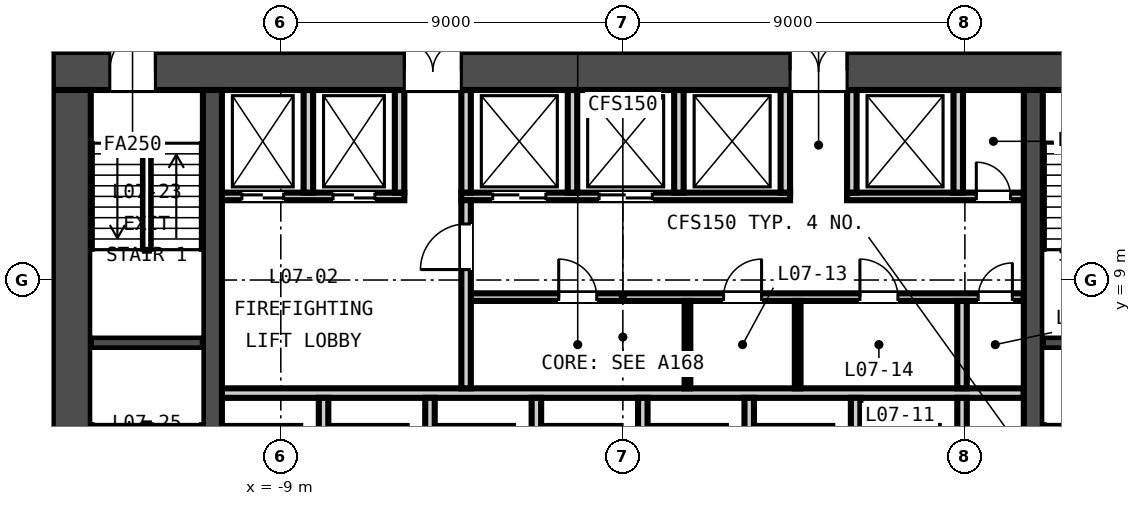
"""IFC4 building model, lengths in metres.
Left out: names, types, materials, properties, quantities, classifications, styles, units other than length and angle.
Written with IfcOpenShell. Run it as: python <this file> out.ifc"""

import sys

from ifc_helpers import new_model, si_unit, direction, frame, frame_2d, origin, place, context, subcontext, project, spatial, rectangle, extrude, element, fill, save


model = new_model("IFC4")
c1 = context("Model", 3, precision=1e-05, world=origin(), true_north=direction((0.0, 1.0)))
c2 = subcontext(c1, "Body", "Model", "MODEL_VIEW")
j1 = project(units=[si_unit("LENGTHUNIT", "METRE"), si_unit("PLANEANGLEUNIT", "RADIAN")], contexts=[c1])
p1 = place(None, origin())
s1 = spatial("IfcSite", under=j1, at=p1, CompositionType="ELEMENT")
p2 = place(p1, origin())
s2 = spatial("IfcBuilding", under=s1, at=p2, CompositionType="ELEMENT")
p3 = place(p2, frame((0.0, 0.0, 39.65)))
s3 = spatial("IfcBuildingStorey", under=s2, at=p3, CompositionType="ELEMENT", Elevation=39.65)
p4 = place(p3, frame((-15.0, 14.5, -0.15), z_axis=(0.0, 0.0, 1.0), x_axis=(1.0, 0.0, 0.0)))
e1 = element("IfcWall", 1, at=p4, inside=s3, PredefinedType="SOLIDWALL", context=c2, shape_type="SweptSolid", body=[
    extrude(rectangle(XDim=30.0, YDim=1.0, at=frame_2d((15.0, 0.0))), origin(), (0.0, 0.0, 1.0), 3.65),
])
p5 = place(p4, frame((9.25, 0.0, 0.15)))
e2 = element("IfcOpeningElement", 2, at=p5, cuts=e1, PredefinedType="OPENING", context=c2, shape_type="SweptSolid", body=[
    extrude(rectangle(XDim=1.5, YDim=2.1, at=frame_2d((0.75, 1.05))), frame((0.0, 0.51, 0.0), z_axis=(0.0, -1.0, 0.0), x_axis=(1.0, 0.0, 0.0)), (0.0, 0.0, 1.0), 1.02),
])
p6 = place(p4, frame((19.4, 0.0, 0.15)))
e3 = element("IfcOpeningElement", 3, at=p6, cuts=e1, PredefinedType="OPENING", context=c2, shape_type="SweptSolid", body=[
    extrude(rectangle(XDim=1.5, YDim=2.1, at=frame_2d((0.75, 1.05))), frame((0.0, 0.51, 0.0), z_axis=(0.0, -1.0, 0.0), x_axis=(1.0, 0.0, 0.0)), (0.0, 0.0, 1.0), 1.02),
])
p7 = place(p4, frame((1.5, 0.0, 0.15)))
e4 = element("IfcOpeningElement", 4, at=p7, cuts=e1, PredefinedType="OPENING", context=c2, shape_type="SweptSolid", body=[
    extrude(rectangle(XDim=1.2, YDim=2.1, at=frame_2d((0.6, 1.05))), frame((0.0, 0.51, 0.0), z_axis=(0.0, -1.0, 0.0), x_axis=(1.0, 0.0, 0.0)), (0.0, 0.0, 1.0), 1.02),
])
p8 = place(p4, frame((27.3, 0.0, 0.15)))
e5 = element("IfcOpeningElement", 5, at=p8, cuts=e1, PredefinedType="OPENING", context=c2, shape_type="SweptSolid", body=[
    extrude(rectangle(XDim=1.2, YDim=2.1, at=frame_2d((0.6, 1.05))), frame((0.0, 0.51, 0.0), z_axis=(0.0, -1.0, 0.0), x_axis=(1.0, 0.0, 0.0)), (0.0, 0.0, 1.0), 1.02),
])
p9 = place(p3, frame((-14.5, 1.0, -0.15), z_axis=(0.0, 0.0, 1.0), x_axis=(0.0, 1.0, 0.0)))
e6 = element("IfcWall", 6, at=p9, inside=s3, PredefinedType="SOLIDWALL", context=c2, shape_type="SweptSolid", body=[
    extrude(rectangle(XDim=13.0, YDim=1.0, at=frame_2d((6.5, 0.0))), origin(), (0.0, 0.0, 1.0), 3.65),
])
for number, where, z_axis, x_axis in (
    (7, (-10.8, 1.0, -0.15), (0.0, 0.0, 1.0), (0.0, 1.0, 0.0)),
    (8, (10.8, 1.0, -0.15), (0.0, 0.0, 1.0), (0.0, 1.0, 0.0)),
):
    element("IfcWall", number, at=place(p3, frame(where, z_axis=z_axis, x_axis=x_axis)), inside=s3, PredefinedType="SOLIDWALL", context=c2, shape_type="SweptSolid", body=[
        extrude(rectangle(XDim=13.0, YDim=0.5, at=frame_2d((6.5, 0.0))), origin(), (0.0, 0.0, 1.0), 3.65),
    ])
p10 = place(p3, frame((-10.55, 6.025, 0.0), z_axis=(0.0, 0.0, 1.0), x_axis=(1.0, 0.0, 0.0)))
e9 = element("IfcWall", 9, at=p10, inside=s3, PredefinedType="PARTITIONING", context=c2, shape_type="SweptSolid", body=[
    extrude(rectangle(XDim=21.1, YDim=0.25, at=frame_2d((10.55, 0.0))), origin(), (0.0, 0.0, 1.0), 3.5),
])
p11 = place(p3, frame((-4.125, 8.55, 0.0), z_axis=(0.0, 0.0, 1.0), x_axis=(1.0, 0.0, 0.0)))
e10 = element("IfcWall", 10, at=p11, inside=s3, PredefinedType="PARTITIONING", context=c2, shape_type="SweptSolid", body=[
    extrude(rectangle(XDim=14.675, YDim=0.2, at=frame_2d((7.337, 0.0))), origin(), (0.0, 0.0, 1.0), 3.5),
])
p12 = place(p11, frame((2.438, 0.0, 0.0)))
e11 = element("IfcOpeningElement", 11, at=p12, cuts=e10, PredefinedType="OPENING", context=c2, shape_type="SweptSolid", body=[
    extrude(rectangle(XDim=1.0, YDim=2.1, at=frame_2d((0.5, 1.05))), frame((0.0, 0.11, 0.0), z_axis=(0.0, -1.0, 0.0), x_axis=(1.0, 0.0, 0.0)), (0.0, 0.0, 1.0), 0.22),
])
p13 = place(p11, frame((6.775, 0.0, 0.0)))
e12 = element("IfcOpeningElement", 12, at=p13, cuts=e10, PredefinedType="OPENING", context=c2, shape_type="SweptSolid", body=[
    extrude(rectangle(XDim=1.0, YDim=2.1, at=frame_2d((0.5, 1.05))), frame((0.0, 0.11, 0.0), z_axis=(0.0, -1.0, 0.0), x_axis=(1.0, 0.0, 0.0)), (0.0, 0.0, 1.0), 0.22),
])
p14 = place(p11, frame((10.363, 0.0, 0.0)))
e13 = element("IfcOpeningElement", 13, at=p14, cuts=e10, PredefinedType="OPENING", context=c2, shape_type="SweptSolid", body=[
    extrude(rectangle(XDim=1.0, YDim=2.1, at=frame_2d((0.5, 1.05))), frame((0.0, 0.11, 0.0), z_axis=(0.0, -1.0, 0.0), x_axis=(1.0, 0.0, 0.0)), (0.0, 0.0, 1.0), 0.22),
])
p15 = place(p11, frame((13.475, 0.0, 0.0)))
e14 = element("IfcOpeningElement", 14, at=p15, cuts=e10, PredefinedType="OPENING", context=c2, shape_type="SweptSolid", body=[
    extrude(rectangle(XDim=0.9, YDim=2.1, at=frame_2d((0.45, 1.05))), frame((0.0, 0.11, 0.0), z_axis=(0.0, -1.0, 0.0), x_axis=(1.0, 0.0, 0.0)), (0.0, 0.0, 1.0), 0.22),
])
p16 = place(p3, frame((-10.55, 11.2, 0.0), z_axis=(0.0, 0.0, 1.0), x_axis=(1.0, 0.0, 0.0)))
e15 = element("IfcWall", 15, at=p16, inside=s3, PredefinedType="PARTITIONING", context=c2, shape_type="SweptSolid", body=[
    extrude(rectangle(XDim=4.8, YDim=0.2, at=frame_2d((2.4, 0.0))), origin(), (0.0, 0.0, 1.0), 3.5),
])
p17 = place(p16, frame((0.525, 0.0, 0.0)))
e16 = element("IfcOpeningElement", 16, at=p17, cuts=e15, PredefinedType="OPENING", context=c2, shape_type="SweptSolid", body=[
    extrude(rectangle(XDim=1.1, YDim=2.1, at=frame_2d((0.55, 1.05))), frame((0.0, 0.11, 0.0), z_axis=(0.0, -1.0, 0.0), x_axis=(1.0, 0.0, 0.0)), (0.0, 0.0, 1.0), 0.22),
])
p18 = place(p16, frame((2.925, 0.0, 0.0)))
e17 = element("IfcOpeningElement", 17, at=p18, cuts=e15, PredefinedType="OPENING", context=c2, shape_type="SweptSolid", body=[
    extrude(rectangle(XDim=1.1, YDim=2.1, at=frame_2d((0.55, 1.05))), frame((0.0, 0.11, 0.0), z_axis=(0.0, -1.0, 0.0), x_axis=(1.0, 0.0, 0.0)), (0.0, 0.0, 1.0), 0.22),
])
p19 = place(p3, frame((-4.25, 11.2, 0.0), z_axis=(0.0, 0.0, 1.0), x_axis=(1.0, 0.0, 0.0)))
e18 = element("IfcWall", 18, at=p19, inside=s3, PredefinedType="PARTITIONING", context=c2, shape_type="SweptSolid", body=[
    extrude(rectangle(XDim=8.65, YDim=0.2, at=frame_2d((4.325, 0.0))), origin(), (0.0, 0.0, 1.0), 3.5),
])
p20 = place(p19, frame((0.825, 0.0, 0.0)))
e19 = element("IfcOpeningElement", 19, at=p20, cuts=e18, PredefinedType="OPENING", context=c2, shape_type="SweptSolid", body=[
    extrude(rectangle(XDim=1.4, YDim=2.1, at=frame_2d((0.7, 1.05))), frame((0.0, 0.11, 0.0), z_axis=(0.0, -1.0, 0.0), x_axis=(1.0, 0.0, 0.0)), (0.0, 0.0, 1.0), 0.22),
])
p21 = place(p19, frame((3.625, 0.0, 0.0)))
e20 = element("IfcOpeningElement", 20, at=p21, cuts=e18, PredefinedType="OPENING", context=c2, shape_type="SweptSolid", body=[
    extrude(rectangle(XDim=1.4, YDim=2.1, at=frame_2d((0.7, 1.05))), frame((0.0, 0.11, 0.0), z_axis=(0.0, -1.0, 0.0), x_axis=(1.0, 0.0, 0.0)), (0.0, 0.0, 1.0), 0.22),
])
p22 = place(p3, frame((5.9, 11.2, 0.0), z_axis=(0.0, 0.0, 1.0), x_axis=(1.0, 0.0, 0.0)))
e21 = element("IfcWall", 21, at=p22, inside=s3, PredefinedType="PARTITIONING", context=c2, shape_type="SweptSolid", body=[
    extrude(rectangle(XDim=4.65, YDim=0.2, at=frame_2d((2.325, 0.0))), origin(), (0.0, 0.0, 1.0), 3.5),
])
p23 = place(p22, frame((3.4, 0.0, 0.0)))
e22 = element("IfcOpeningElement", 22, at=p23, cuts=e21, PredefinedType="OPENING", context=c2, shape_type="SweptSolid", body=[
    extrude(rectangle(XDim=0.9, YDim=2.1, at=frame_2d((0.45, 1.05))), frame((0.0, 0.11, 0.0), z_axis=(0.0, -1.0, 0.0), x_axis=(1.0, 0.0, 0.0)), (0.0, 0.0, 1.0), 0.22),
])
p24 = place(p3, frame((-4.125, 6.15, 0.0), z_axis=(0.0, 0.0, 1.0), x_axis=(0.0, 1.0, 0.0)))
e23 = element("IfcWall", 23, at=p24, inside=s3, PredefinedType="PARTITIONING", context=c2, shape_type="SweptSolid", body=[
    extrude(rectangle(XDim=4.95, YDim=0.25, at=frame_2d((2.475, 0.0))), origin(), (0.0, 0.0, 1.0), 3.5),
])
p25 = place(p24, frame((3.125, 0.0, 0.0)))
e24 = element("IfcOpeningElement", 24, at=p25, cuts=e23, PredefinedType="OPENING", context=c2, shape_type="SweptSolid", body=[
    extrude(rectangle(XDim=1.2, YDim=2.1, at=frame_2d((0.6, 1.05))), frame((0.0, 0.135, 0.0), z_axis=(0.0, -1.0, 0.0), x_axis=(1.0, 0.0, 0.0)), (0.0, 0.0, 1.0), 0.27),
])
for number, where, z_axis, x_axis in (
    (25, (-7.875, 3.6, 0.0), (0.0, 0.0, 1.0), (0.0, 1.0, 0.0)),
    (26, (-5.075, 3.6, 0.0), (0.0, 0.0, 1.0), (0.0, 1.0, 0.0)),
    (27, (-2.275, 3.6, 0.0), (0.0, 0.0, 1.0), (0.0, 1.0, 0.0)),
    (28, (0.525, 3.6, 0.0), (0.0, 0.0, 1.0), (0.0, 1.0, 0.0)),
    (29, (3.325, 3.6, 0.0), (0.0, 0.0, 1.0), (0.0, 1.0, 0.0)),
    (30, (6.125, 3.6, 0.0), (0.0, 0.0, 1.0), (0.0, 1.0, 0.0)),
    (31, (8.925, 3.6, 0.0), (0.0, 0.0, 1.0), (0.0, 1.0, 0.0)),
):
    element("IfcWall", number, at=place(p3, frame(where, z_axis=z_axis, x_axis=x_axis)), inside=s3, PredefinedType="PARTITIONING", context=c2, shape_type="SweptSolid", body=[
        extrude(rectangle(XDim=2.3, YDim=0.25, at=frame_2d((1.15, 0.0))), origin(), (0.0, 0.0, 1.0), 3.5),
    ])
for number, where, z_axis, x_axis in (
    (32, (1.7, 6.15, 0.0), (0.0, 0.0, 1.0), (0.0, 1.0, 0.0)),
    (33, (4.6, 6.15, 0.0), (0.0, 0.0, 1.0), (0.0, 1.0, 0.0)),
):
    element("IfcWall", number, at=place(p3, frame(where, z_axis=z_axis, x_axis=x_axis)), inside=s3, PredefinedType="PARTITIONING", context=c2, shape_type="SweptSolid", body=[
        extrude(rectangle(XDim=2.3, YDim=0.15, at=frame_2d((1.15, 0.0))), origin(), (0.0, 0.0, 1.0), 3.5),
    ])
p26 = place(p3, frame((8.925, 6.15, 0.0), z_axis=(0.0, 0.0, 1.0), x_axis=(0.0, 1.0, 0.0)))
e34 = element("IfcWall", 34, at=p26, inside=s3, PredefinedType="PARTITIONING", context=c2, shape_type="SweptSolid", body=[
    extrude(rectangle(XDim=2.3, YDim=0.25, at=frame_2d((1.15, 0.0))), origin(), (0.0, 0.0, 1.0), 3.5),
])
for number, where, z_axis, x_axis in (
    (35, (-8.275, 11.3, 0.0), (0.0, 0.0, 1.0), (0.0, 1.0, 0.0)),
    (36, (-5.875, 11.3, 0.0), (0.0, 0.0, 1.0), (0.0, 1.0, 0.0)),
    (37, (-4.125, 11.3, 0.0), (0.0, 0.0, 1.0), (0.0, 1.0, 0.0)),
    (38, (-1.325, 11.3, 0.0), (0.0, 0.0, 1.0), (0.0, 1.0, 0.0)),
    (39, (1.475, 11.3, 0.0), (0.0, 0.0, 1.0), (0.0, 1.0, 0.0)),
    (40, (4.275, 11.3, 0.0), (0.0, 0.0, 1.0), (0.0, 1.0, 0.0)),
    (41, (6.025, 11.3, 0.0), (0.0, 0.0, 1.0), (0.0, 1.0, 0.0)),
    (42, (8.825, 11.3, 0.0), (0.0, 0.0, 1.0), (0.0, 1.0, 0.0)),
):
    element("IfcWall", number, at=place(p3, frame(where, z_axis=z_axis, x_axis=x_axis)), inside=s3, PredefinedType="PARTITIONING", context=c2, shape_type="SweptSolid", body=[
        extrude(rectangle(XDim=2.7, YDim=0.25, at=frame_2d((1.35, 0.0))), origin(), (0.0, 0.0, 1.0), 3.5),
    ])
for number, where, z_axis, x_axis in (
    (43, (-14.0, 7.35, -0.15), (0.0, 0.0, 1.0), (1.0, 0.0, 0.0)),
    (44, (11.05, 7.35, -0.15), (0.0, 0.0, 1.0), (1.0, 0.0, 0.0)),
):
    element("IfcWall", number, at=place(p3, frame(where, z_axis=z_axis, x_axis=x_axis)), inside=s3, PredefinedType="SOLIDWALL", context=c2, shape_type="SweptSolid", body=[
        extrude(rectangle(XDim=2.95, YDim=0.3, at=frame_2d((1.475, 0.0))), origin(), (0.0, 0.0, 1.0), 3.65),
    ])
p27 = place(p25, origin())
e45 = element("IfcDoor", 45, at=p27, inside=s3, OperationType="SINGLE_SWING_LEFT", PredefinedType="DOOR", context=c2, shape_type="SweptSolid", body=[
    extrude(rectangle(XDim=1.2, YDim=2.1, at=frame_2d((0.6, 1.05))), frame((0.0, 0.025, 0.0), z_axis=(0.0, -1.0, 0.0), x_axis=(1.0, 0.0, 0.0)), (0.0, 0.0, 1.0), 0.05),
])
fill(e24, e45)
p28 = place(p12, origin())
e46 = element("IfcDoor", 46, at=p28, inside=s3, OperationType="SINGLE_SWING_LEFT", PredefinedType="DOOR", context=c2, shape_type="SweptSolid", body=[
    extrude(rectangle(XDim=1.0, YDim=2.1, at=frame_2d((0.5, 1.05))), frame((0.0, 0.025, 0.0), z_axis=(0.0, -1.0, 0.0), x_axis=(1.0, 0.0, 0.0)), (0.0, 0.0, 1.0), 0.05),
])
fill(e11, e46)
p29 = place(p13, origin())
e47 = element("IfcDoor", 47, at=p29, inside=s3, OperationType="SINGLE_SWING_RIGHT", PredefinedType="DOOR", context=c2, shape_type="SweptSolid", body=[
    extrude(rectangle(XDim=1.0, YDim=2.1, at=frame_2d((0.5, 1.05))), frame((0.0, 0.025, 0.0), z_axis=(0.0, -1.0, 0.0), x_axis=(1.0, 0.0, 0.0)), (0.0, 0.0, 1.0), 0.05),
])
fill(e12, e47)
p30 = place(p14, origin())
e48 = element("IfcDoor", 48, at=p30, inside=s3, OperationType="SINGLE_SWING_LEFT", PredefinedType="DOOR", context=c2, shape_type="SweptSolid", body=[
    extrude(rectangle(XDim=1.0, YDim=2.1, at=frame_2d((0.5, 1.05))), frame((0.0, 0.025, 0.0), z_axis=(0.0, -1.0, 0.0), x_axis=(1.0, 0.0, 0.0)), (0.0, 0.0, 1.0), 0.05),
])
fill(e13, e48)
p31 = place(p15, origin())
e49 = element("IfcDoor", 49, at=p31, inside=s3, OperationType="SINGLE_SWING_RIGHT", PredefinedType="DOOR", context=c2, shape_type="SweptSolid", body=[
    extrude(rectangle(XDim=0.9, YDim=2.1, at=frame_2d((0.45, 1.05))), frame((0.0, 0.025, 0.0), z_axis=(0.0, -1.0, 0.0), x_axis=(1.0, 0.0, 0.0)), (0.0, 0.0, 1.0), 0.05),
])
fill(e14, e49)
p32 = place(p17, origin())
e50 = element("IfcDoor", 50, at=p32, inside=s3, OperationType="DOUBLE_DOOR_SLIDING", PredefinedType="DOOR", context=c2, shape_type="SweptSolid", body=[
    extrude(rectangle(XDim=1.1, YDim=2.1, at=frame_2d((0.55, 1.05))), frame((0.0, 0.025, 0.0), z_axis=(0.0, -1.0, 0.0), x_axis=(1.0, 0.0, 0.0)), (0.0, 0.0, 1.0), 0.05),
])
fill(e16, e50)
p33 = place(p18, origin())
e51 = element("IfcDoor", 51, at=p33, inside=s3, OperationType="DOUBLE_DOOR_SLIDING", PredefinedType="DOOR", context=c2, shape_type="SweptSolid", body=[
    extrude(rectangle(XDim=1.1, YDim=2.1, at=frame_2d((0.55, 1.05))), frame((0.0, 0.025, 0.0), z_axis=(0.0, -1.0, 0.0), x_axis=(1.0, 0.0, 0.0)), (0.0, 0.0, 1.0), 0.05),
])
fill(e17, e51)
p34 = place(p20, origin())
e52 = element("IfcDoor", 52, at=p34, inside=s3, OperationType="DOUBLE_DOOR_SLIDING", PredefinedType="DOOR", context=c2, shape_type="SweptSolid", body=[
    extrude(rectangle(XDim=1.4, YDim=2.1, at=frame_2d((0.7, 1.05))), frame((0.0, 0.025, 0.0), z_axis=(0.0, -1.0, 0.0), x_axis=(1.0, 0.0, 0.0)), (0.0, 0.0, 1.0), 0.05),
])
fill(e19, e52)
p35 = place(p21, origin())
e53 = element("IfcDoor", 53, at=p35, inside=s3, OperationType="DOUBLE_DOOR_SLIDING", PredefinedType="DOOR", context=c2, shape_type="SweptSolid", body=[
    extrude(rectangle(XDim=1.4, YDim=2.1, at=frame_2d((0.7, 1.05))), frame((0.0, 0.025, 0.0), z_axis=(0.0, -1.0, 0.0), x_axis=(1.0, 0.0, 0.0)), (0.0, 0.0, 1.0), 0.05),
])
fill(e20, e53)
p36 = place(p23, origin())
e54 = element("IfcDoor", 54, at=p36, inside=s3, OperationType="SINGLE_SWING_LEFT", PredefinedType="DOOR", context=c2, shape_type="SweptSolid", body=[
    extrude(rectangle(XDim=0.9, YDim=2.1, at=frame_2d((0.45, 1.05))), frame((0.0, 0.025, 0.0), z_axis=(0.0, -1.0, 0.0), x_axis=(1.0, 0.0, 0.0)), (0.0, 0.0, 1.0), 0.05),
])
fill(e22, e54)
p37 = place(p5, origin())
e55 = element("IfcDoor", 55, at=p37, inside=s3, OperationType="DOUBLE_DOOR_SINGLE_SWING", PredefinedType="DOOR", context=c2, shape_type="SweptSolid", body=[
    extrude(rectangle(XDim=1.5, YDim=2.1, at=frame_2d((0.75, 1.05))), frame((0.0, 0.025, 0.0), z_axis=(0.0, -1.0, 0.0), x_axis=(1.0, 0.0, 0.0)), (0.0, 0.0, 1.0), 0.05),
])
fill(e2, e55)
p38 = place(p6, origin())
e56 = element("IfcDoor", 56, at=p38, inside=s3, OperationType="DOUBLE_DOOR_SINGLE_SWING", PredefinedType="DOOR", context=c2, shape_type="SweptSolid", body=[
    extrude(rectangle(XDim=1.5, YDim=2.1, at=frame_2d((0.75, 1.05))), frame((0.0, 0.025, 0.0), z_axis=(0.0, -1.0, 0.0), x_axis=(1.0, 0.0, 0.0)), (0.0, 0.0, 1.0), 0.05),
])
fill(e3, e56)
p39 = place(p7, origin())
e57 = element("IfcDoor", 57, at=p39, inside=s3, OperationType="SINGLE_SWING_RIGHT", PredefinedType="DOOR", context=c2, shape_type="SweptSolid", body=[
    extrude(rectangle(XDim=1.2, YDim=2.1, at=frame_2d((0.6, 1.05))), frame((0.0, 0.025, 0.0), z_axis=(0.0, -1.0, 0.0), x_axis=(1.0, 0.0, 0.0)), (0.0, 0.0, 1.0), 0.05),
])
fill(e4, e57)
save(model, sys.argv[1])
